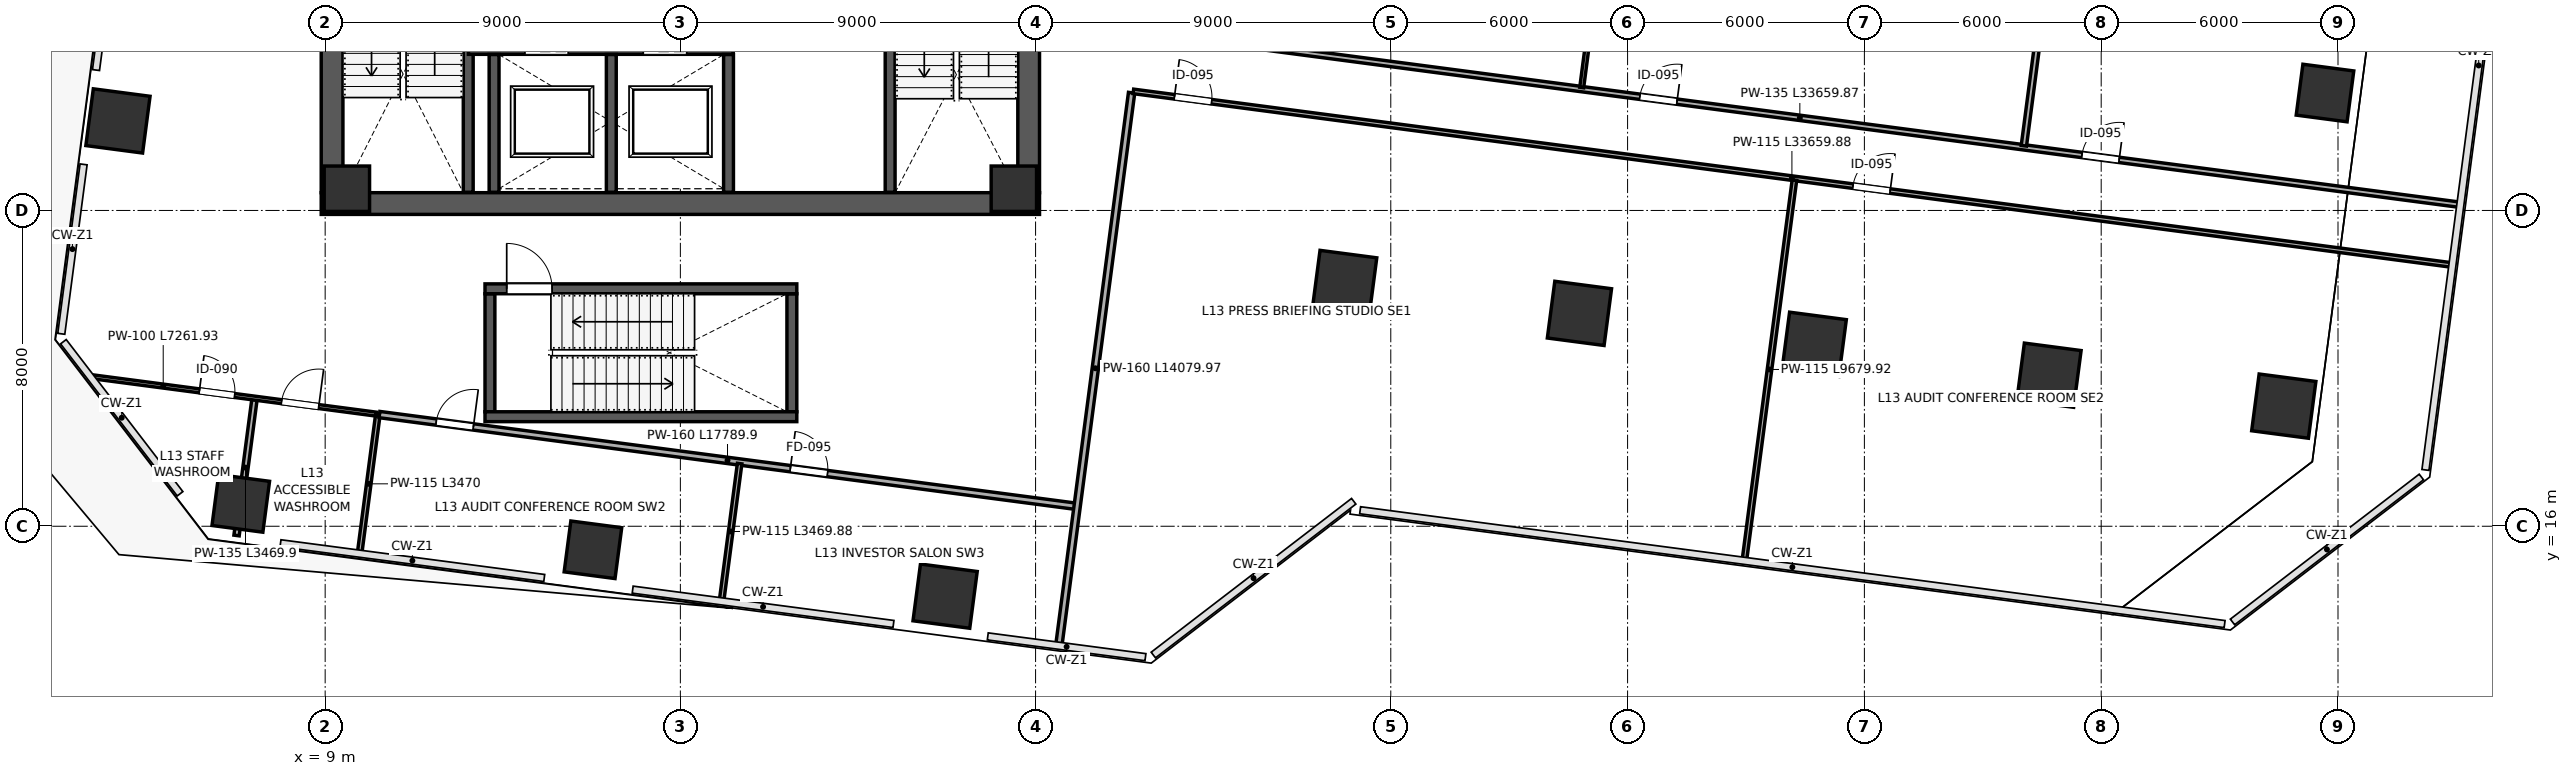
"""IFC4 building model, lengths in metres.
Left out: names, types, materials, properties, quantities, classifications, styles, units other than length and angle.
Written with IfcOpenShell. Run it as: python <this file> out.ifc"""

import sys

from ifc_helpers import new_model, si_unit, direction, frame, frame_2d, origin, origin_2d, place, context, subcontext, project, spatial, rectangle, extrude, source, transform, mapped, element, fill, save


model = new_model("IFC4")
c1 = context("Model", 3, precision=1e-05, world=origin(), true_north=direction((0.0, 1.0)))
c2 = subcontext(c1, "Body", "Model", "MODEL_VIEW")
j1 = project(units=[si_unit("LENGTHUNIT", "METRE"), si_unit("PLANEANGLEUNIT", "RADIAN")], contexts=[c1])
p1 = place(None, origin())
s1 = spatial("IfcSite", under=j1, at=p1, CompositionType="ELEMENT")
p2 = place(p1, origin())
s2 = spatial("IfcBuilding", under=s1, at=p2, CompositionType="ELEMENT")
p3 = place(p2, frame((0.0, 0.0, 61.6)))
s3 = spatial("IfcBuildingStorey", under=s2, at=p3, CompositionType="ELEMENT", Elevation=61.6)
m1 = source(origin(), c2, "Body", "SweptSolid", [
    extrude(rectangle(XDim=1.15, YDim=1.15, at=origin_2d()), origin(), (0.0, 0.0, 1.0), 4.798),
])
for number, where, z_axis, x_axis in (
    (1, (9.55, 24.55, 0.001), (0.0, 0.0, 1.0), (1.0, 0.0, 0.0)),
    (2, (26.45, 24.55, 0.001), (0.0, 0.0, 1.0), (1.0, 0.0, 0.0)),
):
    element("IfcColumn", number, at=place(p3, frame(where, z_axis=z_axis, x_axis=x_axis)), inside=s3, PredefinedType="COLUMN", context=c2, shape_type="MappedRepresentation", body=[
        mapped(m1, transform((0.0, 0.0, 0.0), scale=1.0)),
    ])
m2 = source(origin(), c2, "Body", "SweptSolid", [
    extrude(rectangle(XDim=1.3, YDim=1.3, at=origin_2d()), origin(), (0.0, 0.0, 1.0), 4.798),
])
for number, where, z_axis, x_axis in (
    (3, (6.862, 16.579, 0.001), (0.0, 0.0, 1.0), (-0.991, 0.131, 0.0)),
    (4, (15.785, 15.404, 0.001), (0.0, 0.0, 1.0), (-0.991, 0.131, 0.0)),
):
    element("IfcColumn", number, at=place(p3, frame(where, z_axis=z_axis, x_axis=x_axis)), inside=s3, PredefinedType="COLUMN", context=c2, shape_type="MappedRepresentation", body=[
        mapped(m2, transform((0.0, 0.0, 0.0), scale=1.0)),
    ])
m3 = source(origin(), c2, "Body", "SweptSolid", [
    extrude(rectangle(XDim=1.45, YDim=1.45, at=origin_2d()), origin(), (0.0, 0.0, 1.0), 4.798),
])
p4 = place(p3, frame((24.708, 14.229, 0.001), z_axis=(0.0, 0.0, 1.0), x_axis=(-0.991444861374, 0.13052619222, 0.0)))
e5 = element("IfcColumn", 5, at=p4, inside=s3, PredefinedType="COLUMN", context=c2, shape_type="MappedRepresentation", body=[
    mapped(m3, transform((0.0, 0.0, 0.0), scale=1.0)),
])
m4 = source(origin(), c2, "Body", "SweptSolid", [
    extrude(rectangle(XDim=1.45, YDim=1.45, at=origin_2d()), origin(), (0.0, 0.0, 1.0), 4.798),
])
for number, where, z_axis, x_axis in (
    (6, (34.832, 22.176, 0.001), (0.0, 0.0, 1.0), (-0.991, 0.131, 0.0)),
    (7, (40.781, 21.393, 0.001), (0.0, 0.0, 1.0), (-0.991, 0.131, 0.0)),
    (8, (46.729, 20.61, 0.001), (0.0, 0.0, 1.0), (-0.991, 0.131, 0.0)),
    (9, (52.678, 19.826, 0.001), (0.0, 0.0, 1.0), (-0.991, 0.131, 0.0)),
):
    element("IfcColumn", number, at=place(p3, frame(where, z_axis=z_axis, x_axis=x_axis)), inside=s3, PredefinedType="COLUMN", context=c2, shape_type="MappedRepresentation", body=[
        mapped(m4, transform((0.0, 0.0, 0.0), scale=1.0)),
    ])
p5 = place(p3, frame((58.626, 19.043, 0.001), z_axis=(0.0, 0.0, 1.0), x_axis=(-0.991444861374, 0.13052619222, 0.0)))
e10 = element("IfcColumn", 10, at=p5, inside=s3, PredefinedType="COLUMN", context=c2, shape_type="MappedRepresentation", body=[
    mapped(m3, transform((0.0, 0.0, 0.0), scale=1.0)),
])
p6 = place(p3, frame((59.671, 26.975, 0.001), z_axis=(0.0, 0.0, 1.0), x_axis=(-0.991444861374, 0.13052619222, 0.0)))
e11 = element("IfcColumn", 11, at=p6, inside=s3, PredefinedType="COLUMN", context=c2, shape_type="MappedRepresentation", body=[
    mapped(m2, transform((0.0, 0.0, 0.0), scale=1.0)),
])
p7 = place(p3, frame((3.75, 26.268, 0.001), z_axis=(0.0, 0.0, 1.0), x_axis=(-0.991444861374, 0.13052619222, 0.0)))
e12 = element("IfcColumn", 12, at=p7, inside=s3, PredefinedType="COLUMN", context=c2, shape_type="MappedRepresentation", body=[
    mapped(m3, transform((0.0, 0.0, 0.0), scale=1.0)),
])
p8 = place(p3, frame((9.175, 24.45, 0.0), z_axis=(0.0, 0.0, 1.0), x_axis=(0.0, 1.0, 0.0)))
e13 = element("IfcWall", 13, at=p8, inside=s3, PredefinedType="SHEAR", context=c2, shape_type="SweptSolid", body=[
    extrude(rectangle(XDim=15.1, YDim=0.55, at=frame_2d((7.55, 0.0))), origin(), (0.0, 0.0, 1.0), 4.56),
])
p9 = place(p3, frame((26.825, 24.45, 0.0), z_axis=(0.0, 0.0, 1.0), x_axis=(0.0, 1.0, 0.0)))
e14 = element("IfcWall", 14, at=p9, inside=s3, PredefinedType="SHEAR", context=c2, shape_type="SweptSolid", body=[
    extrude(rectangle(XDim=15.1, YDim=0.55, at=frame_2d((7.55, 0.0))), origin(), (0.0, 0.0, 1.0), 4.56),
])
p10 = place(p9, frame((8.6, 0.0, 0.0)))
e15 = element("IfcOpeningElement", 15, at=p10, cuts=e14, PredefinedType="OPENING", context=c2, shape_type="SweptSolid", body=[
    extrude(rectangle(XDim=1.15, YDim=2.2, at=frame_2d((0.575, 1.1))), frame((0.0, 0.285, 0.0), z_axis=(0.0, -1.0, 0.0), x_axis=(1.0, 0.0, 0.0)), (0.0, 0.0, 1.0), 0.57),
])
p11 = place(p3, frame((8.9, 24.175, 0.0), z_axis=(0.0, 0.0, 1.0), x_axis=(1.0, 0.0, 0.0)))
e16 = element("IfcWall", 16, at=p11, inside=s3, PredefinedType="SHEAR", context=c2, shape_type="SweptSolid", body=[
    extrude(rectangle(XDim=18.2, YDim=0.55, at=frame_2d((9.1, 0.0))), origin(), (0.0, 0.0, 1.0), 4.56),
])
p12 = place(p3, frame((12.625, 24.46, 0.0), z_axis=(0.0, 0.0, 1.0), x_axis=(0.0, 1.0, 0.0)))
e17 = element("IfcWall", 17, at=p12, inside=s3, PredefinedType="SHEAR", context=c2, shape_type="SweptSolid", body=[
    extrude(rectangle(XDim=7.49, YDim=0.25, at=frame_2d((3.745, 0.0))), origin(), (0.0, 0.0, 1.0), 4.56),
])
p13 = place(p12, frame((5.85, 0.0, 0.0)))
e18 = element("IfcOpeningElement", 18, at=p13, cuts=e17, PredefinedType="OPENING", context=c2, shape_type="SweptSolid", body=[
    extrude(rectangle(XDim=1.15, YDim=2.2, at=frame_2d((0.575, 1.1))), frame((0.0, 0.135, 0.0), z_axis=(0.0, -1.0, 0.0), x_axis=(1.0, 0.0, 0.0)), (0.0, 0.0, 1.0), 0.27),
])
p14 = place(p3, frame((23.315, 24.46, 0.0), z_axis=(0.0, 0.0, 1.0), x_axis=(0.0, 1.0, 0.0)))
e19 = element("IfcWall", 19, at=p14, inside=s3, PredefinedType="SHEAR", context=c2, shape_type="SweptSolid", body=[
    extrude(rectangle(XDim=7.49, YDim=0.25, at=frame_2d((3.745, 0.0))), origin(), (0.0, 0.0, 1.0), 4.56),
])
p15 = place(p3, frame((12.63, 28.08, 0.0), z_axis=(0.0, 0.0, 1.0), x_axis=(1.0, 0.0, 0.0)))
e20 = element("IfcWall", 20, at=p15, inside=s3, PredefinedType="SHEAR", context=c2, shape_type="SweptSolid", body=[
    extrude(rectangle(XDim=6.71, YDim=0.25, at=frame_2d((3.355, 0.0))), origin(), (0.0, 0.0, 1.0), 4.56),
])
p16 = place(p15, frame((1.43, 0.0, 0.0)))
e21 = element("IfcOpeningElement", 21, at=p16, cuts=e20, PredefinedType="OPENING", context=c2, shape_type="SweptSolid", body=[
    extrude(rectangle(XDim=1.1, YDim=2.2, at=frame_2d((0.55, 1.1))), frame((0.0, 0.135, 0.0), z_axis=(0.0, -1.0, 0.0), x_axis=(1.0, 0.0, 0.0)), (0.0, 0.0, 1.0), 0.27),
])
p17 = place(p15, frame((4.43, 0.0, 0.0)))
e22 = element("IfcOpeningElement", 22, at=p17, cuts=e20, PredefinedType="OPENING", context=c2, shape_type="SweptSolid", body=[
    extrude(rectangle(XDim=1.1, YDim=2.2, at=frame_2d((0.55, 1.1))), frame((0.0, 0.135, 0.0), z_axis=(0.0, -1.0, 0.0), x_axis=(1.0, 0.0, 0.0)), (0.0, 0.0, 1.0), 0.27),
])
for number, where, z_axis, x_axis in (
    (23, (13.28, 24.46, 0.0), (0.0, 0.0, 1.0), (0.0, 1.0, 0.0)),
    (24, (16.25, 24.46, 0.0), (0.0, 0.0, 1.0), (0.0, 1.0, 0.0)),
    (25, (19.22, 24.46, 0.0), (0.0, 0.0, 1.0), (0.0, 1.0, 0.0)),
):
    element("IfcWall", number, at=place(p3, frame(where, z_axis=z_axis, x_axis=x_axis)), inside=s3, PredefinedType="SHEAR", context=c2, shape_type="SweptSolid", body=[
        extrude(rectangle(XDim=3.49, YDim=0.25, at=frame_2d((1.745, 0.0))), origin(), (0.0, 0.0, 1.0), 4.56),
    ])
for number, where, z_axis, x_axis in (
    (26, (13.175, 18.9, 0.0), (0.0, 0.0, 1.0), (0.0, 1.0, 0.0)),
    (27, (20.825, 18.9, 0.0), (0.0, 0.0, 1.0), (0.0, 1.0, 0.0)),
):
    element("IfcWall", number, at=place(p3, frame(where, z_axis=z_axis, x_axis=x_axis)), inside=s3, PredefinedType="SHEAR", context=c2, shape_type="SweptSolid", body=[
        extrude(rectangle(XDim=2.99, YDim=0.25, at=frame_2d((1.495, 0.0))), origin(), (0.0, 0.0, 1.0), 4.56),
    ])
p18 = place(p3, frame((13.05, 18.775, 0.0), z_axis=(0.0, 0.0, 1.0), x_axis=(1.0, 0.0, 0.0)))
e28 = element("IfcWall", 28, at=p18, inside=s3, PredefinedType="SHEAR", context=c2, shape_type="SweptSolid", body=[
    extrude(rectangle(XDim=7.9, YDim=0.25, at=frame_2d((3.95, 0.0))), origin(), (0.0, 0.0, 1.0), 4.56),
])
p19 = place(p3, frame((13.05, 22.015, 0.0), z_axis=(0.0, 0.0, 1.0), x_axis=(1.0, 0.0, 0.0)))
e29 = element("IfcWall", 29, at=p19, inside=s3, PredefinedType="SHEAR", context=c2, shape_type="SweptSolid", body=[
    extrude(rectangle(XDim=7.9, YDim=0.25, at=frame_2d((3.95, 0.0))), origin(), (0.0, 0.0, 1.0), 4.56),
])
p20 = place(p19, frame((0.55, 0.0, 0.0)))
e30 = element("IfcOpeningElement", 30, at=p20, cuts=e29, PredefinedType="OPENING", context=c2, shape_type="SweptSolid", body=[
    extrude(rectangle(XDim=1.15, YDim=2.2, at=frame_2d((0.575, 1.1))), frame((0.0, 0.135, 0.0), z_axis=(0.0, -1.0, 0.0), x_axis=(1.0, 0.0, 0.0)), (0.0, 0.0, 1.0), 0.27),
])
p21 = place(p3, frame((6.755, 15.766, 0.0), z_axis=(0.0, 0.0, 1.0), x_axis=(0.130518214887, 0.991445911577, 0.0)))
e31 = element("IfcWall", 31, at=p21, inside=s3, PredefinedType="PARTITIONING", context=c2, shape_type="SweptSolid", body=[
    extrude(rectangle(XDim=3.47, YDim=0.135, at=frame_2d((1.735, 0.0))), origin(), (0.0, 0.0, 1.0), 3.695),
])
p22 = place(p3, frame((9.878, 15.354, 0.0), z_axis=(0.0, 0.0, 1.0), x_axis=(0.130509110781, 0.991447110038, 0.0)))
e32 = element("IfcWall", 32, at=p22, inside=s3, PredefinedType="PARTITIONING", context=c2, shape_type="SweptSolid", body=[
    extrude(rectangle(XDim=3.47, YDim=0.115, at=frame_2d((1.735, 0.0))), origin(), (0.0, 0.0, 1.0), 3.695),
])
p23 = place(p3, frame((3.097, 19.788, 0.0), z_axis=(0.0, 0.0, 1.0), x_axis=(0.99144674145, -0.130511910828, 0.0)))
e33 = element("IfcWall", 33, at=p23, inside=s3, PredefinedType="PARTITIONING", context=c2, shape_type="SweptSolid", body=[
    extrude(rectangle(XDim=7.262, YDim=0.1, at=frame_2d((3.631, 0.0))), origin(), (0.0, 0.0, 1.0), 4.56),
])
p24 = place(p23, frame((2.74, 0.0, 0.0)))
e34 = element("IfcOpeningElement", 34, at=p24, cuts=e33, PredefinedType="OPENING", context=c2, shape_type="SweptSolid", body=[
    extrude(rectangle(XDim=0.9, YDim=2.15, at=frame_2d((0.45, 1.075))), frame((0.0, 0.06, 0.0), z_axis=(0.0, -1.0, 0.0), x_axis=(1.0, 0.0, 0.0)), (0.0, 0.0, 1.0), 0.12),
])
p25 = place(p23, frame((4.84, 0.0, 0.0)))
e35 = element("IfcOpeningElement", 35, at=p25, cuts=e33, PredefinedType="OPENING", context=c2, shape_type="SweptSolid", body=[
    extrude(rectangle(XDim=0.95, YDim=2.15, at=frame_2d((0.475, 1.075))), frame((0.0, 0.06, 0.0), z_axis=(0.0, -1.0, 0.0), x_axis=(1.0, 0.0, 0.0)), (0.0, 0.0, 1.0), 0.12),
])
p26 = place(p3, frame((10.376, 18.829, 0.0), z_axis=(0.0, 0.0, 1.0), x_axis=(0.99144504436, -0.130524802294, 0.0)))
e36 = element("IfcWall", 36, at=p26, inside=s3, PredefinedType="PARTITIONING", context=c2, shape_type="SweptSolid", body=[
    extrude(rectangle(XDim=17.79, YDim=0.16, at=frame_2d((8.895, 0.0))), origin(), (0.0, 0.0, 1.0), 4.56),
])
p27 = place(p26, frame((1.45, 0.0, 0.0)))
e37 = element("IfcOpeningElement", 37, at=p27, cuts=e36, PredefinedType="OPENING", context=c2, shape_type="SweptSolid", body=[
    extrude(rectangle(XDim=0.95, YDim=2.15, at=frame_2d((0.475, 1.075))), frame((0.0, 0.09, 0.0), z_axis=(0.0, -1.0, 0.0), x_axis=(1.0, 0.0, 0.0)), (0.0, 0.0, 1.0), 0.18),
])
p28 = place(p26, frame((10.5, 0.0, 0.0)))
e38 = element("IfcOpeningElement", 38, at=p28, cuts=e36, PredefinedType="OPENING", context=c2, shape_type="SweptSolid", body=[
    extrude(rectangle(XDim=0.95, YDim=2.15, at=frame_2d((0.475, 1.075))), frame((0.0, 0.09, 0.0), z_axis=(0.0, -1.0, 0.0), x_axis=(1.0, 0.0, 0.0)), (0.0, 0.0, 1.0), 0.18),
])
p29 = place(p3, frame((19.049, 14.147, 0.0), z_axis=(0.0, 0.0, 1.0), x_axis=(0.130518214887, 0.991445911577, 0.0)))
e39 = element("IfcWall", 39, at=p29, inside=s3, PredefinedType="PARTITIONING", context=c2, shape_type="SweptSolid", body=[
    extrude(rectangle(XDim=3.47, YDim=0.115, at=frame_2d((1.735, 0.0))), origin(), (0.0, 0.0, 1.0), 3.695),
])
p30 = place(p3, frame((27.595, 13.022, 0.0), z_axis=(0.0, 0.0, 1.0), x_axis=(0.130532558102, 0.991444023269, 0.0)))
e40 = element("IfcWall", 40, at=p30, inside=s3, PredefinedType="PARTITIONING", context=c2, shape_type="SweptSolid", body=[
    extrude(rectangle(XDim=14.08, YDim=0.16, at=frame_2d((7.04, 0.0))), origin(), (0.0, 0.0, 1.0), 4.56),
])
p31 = place(p3, frame((29.679, 28.543, 0.0), z_axis=(0.0, 0.0, 1.0), x_axis=(0.991444714197, -0.130527310133, 0.0)))
e41 = element("IfcWall", 41, at=p31, inside=s3, PredefinedType="PARTITIONING", context=c2, shape_type="SweptSolid", body=[
    extrude(rectangle(XDim=33.66, YDim=0.135, at=frame_2d((16.83, 0.0))), origin(), (0.0, 0.0, 1.0), 3.695),
])
p32 = place(p31, frame((1.05, 0.0, 0.0)))
e42 = element("IfcOpeningElement", 42, at=p32, cuts=e41, PredefinedType="OPENING", context=c2, shape_type="SweptSolid", body=[
    extrude(rectangle(XDim=0.95, YDim=2.15, at=frame_2d((0.475, 1.075))), frame((0.0, 0.078, 0.0), z_axis=(0.0, -1.0, 0.0), x_axis=(1.0, 0.0, 0.0)), (0.0, 0.0, 1.0), 0.155),
])
p33 = place(p31, frame((12.74, 0.0, 0.0)))
e43 = element("IfcOpeningElement", 43, at=p33, cuts=e41, PredefinedType="OPENING", context=c2, shape_type="SweptSolid", body=[
    extrude(rectangle(XDim=0.95, YDim=2.15, at=frame_2d((0.475, 1.075))), frame((0.0, 0.078, 0.0), z_axis=(0.0, -1.0, 0.0), x_axis=(1.0, 0.0, 0.0)), (0.0, 0.0, 1.0), 0.155),
])
p34 = place(p31, frame((24.04, 0.0, 0.0)))
e44 = element("IfcOpeningElement", 44, at=p34, cuts=e41, PredefinedType="OPENING", context=c2, shape_type="SweptSolid", body=[
    extrude(rectangle(XDim=0.95, YDim=2.15, at=frame_2d((0.475, 1.075))), frame((0.0, 0.078, 0.0), z_axis=(0.0, -1.0, 0.0), x_axis=(1.0, 0.0, 0.0)), (0.0, 0.0, 1.0), 0.155),
])
p35 = place(p3, frame((29.478, 27.016, 0.0), z_axis=(0.0, 0.0, 1.0), x_axis=(0.991444590622, -0.130528248771, 0.0)))
e45 = element("IfcWall", 45, at=p35, inside=s3, PredefinedType="PARTITIONING", context=c2, shape_type="SweptSolid", body=[
    extrude(rectangle(XDim=33.66, YDim=0.115, at=frame_2d((16.83, 0.0))), origin(), (0.0, 0.0, 1.0), 3.695),
])
p36 = place(p35, frame((1.05, 0.0, 0.0)))
e46 = element("IfcOpeningElement", 46, at=p36, cuts=e45, PredefinedType="OPENING", context=c2, shape_type="SweptSolid", body=[
    extrude(rectangle(XDim=0.95, YDim=2.15, at=frame_2d((0.475, 1.075))), frame((0.0, 0.067, 0.0), z_axis=(0.0, -1.0, 0.0), x_axis=(1.0, 0.0, 0.0)), (0.0, 0.0, 1.0), 0.135),
])
p37 = place(p35, frame((18.39, 0.0, 0.0)))
e47 = element("IfcOpeningElement", 47, at=p37, cuts=e45, PredefinedType="OPENING", context=c2, shape_type="SweptSolid", body=[
    extrude(rectangle(XDim=0.95, YDim=2.15, at=frame_2d((0.475, 1.075))), frame((0.0, 0.067, 0.0), z_axis=(0.0, -1.0, 0.0), x_axis=(1.0, 0.0, 0.0)), (0.0, 0.0, 1.0), 0.135),
])
p38 = place(p3, frame((40.838, 27.114, 0.0), z_axis=(0.0, 0.0, 1.0), x_axis=(0.130538190585, 0.991443281685, 0.0)))
e48 = element("IfcWall", 48, at=p38, inside=s3, PredefinedType="PARTITIONING", context=c2, shape_type="SweptSolid", body=[
    extrude(rectangle(XDim=18.34, YDim=0.1, at=frame_2d((9.17, 0.0))), origin(), (0.0, 0.0, 1.0), 4.56),
])
p39 = place(p3, frame((52.041, 25.639, 0.0), z_axis=(0.0, 0.0, 1.0), x_axis=(0.130523382643, 0.991445231258, 0.0)))
e49 = element("IfcWall", 49, at=p39, inside=s3, PredefinedType="PARTITIONING", context=c2, shape_type="SweptSolid", body=[
    extrude(rectangle(XDim=18.34, YDim=0.135, at=frame_2d((9.17, 0.0))), origin(), (0.0, 0.0, 1.0), 3.923),
])
p40 = place(p3, frame((44.964, 15.173, 0.0), z_axis=(0.0, 0.0, 1.0), x_axis=(0.130519754353, 0.991445708914, 0.0)))
e50 = element("IfcWall", 50, at=p40, inside=s3, PredefinedType="PARTITIONING", context=c2, shape_type="SweptSolid", body=[
    extrude(rectangle(XDim=9.68, YDim=0.115, at=frame_2d((4.84, 0.0))), origin(), (0.0, 0.0, 1.0), 4.56),
])
m5 = source(origin(), c2, "Body", "SweptSolid", [
    extrude(rectangle(XDim=1.15, YDim=2.2, at=frame_2d((0.575, 1.1))), frame((0.0, 0.025, 0.0), z_axis=(0.0, -1.0, 0.0), x_axis=(1.0, 0.0, 0.0)), (0.0, 0.0, 1.0), 0.05),
])
p41 = place(p20, origin())
e51 = element("IfcDoor", 51, at=p41, inside=s3, OperationType="SINGLE_SWING_LEFT", PredefinedType="DOOR", context=c2, shape_type="MappedRepresentation", body=[
    mapped(m5, transform((0.0, 0.0, 0.0), scale=1.0)),
])
fill(e30, e51)
m6 = source(origin(), c2, "Body", "SweptSolid", [
    extrude(rectangle(XDim=0.9, YDim=2.15, at=frame_2d((0.45, 1.075))), frame((0.0, 0.025, 0.0), z_axis=(0.0, -1.0, 0.0), x_axis=(1.0, 0.0, 0.0)), (0.0, 0.0, 1.0), 0.05),
])
p42 = place(p24, origin())
e52 = element("IfcDoor", 52, at=p42, inside=s3, OperationType="SINGLE_SWING_LEFT", PredefinedType="DOOR", context=c2, shape_type="MappedRepresentation", body=[
    mapped(m6, transform((0.0, 0.0, 0.0), scale=1.0)),
])
fill(e34, e52)
m7 = source(origin(), c2, "Body", "SweptSolid", [
    extrude(rectangle(XDim=0.95, YDim=2.15, at=frame_2d((0.475, 1.075))), frame((0.0, 0.025, 0.0), z_axis=(0.0, -1.0, 0.0), x_axis=(1.0, 0.0, 0.0)), (0.0, 0.0, 1.0), 0.05),
])
p43 = place(p25, origin())
e53 = element("IfcDoor", 53, at=p43, inside=s3, OperationType="SINGLE_SWING_RIGHT", PredefinedType="DOOR", context=c2, shape_type="MappedRepresentation", body=[
    mapped(m7, transform((0.0, 0.0, 0.0), scale=1.0)),
])
fill(e35, e53)
m8 = source(origin(), c2, "Body", "SweptSolid", [
    extrude(rectangle(XDim=0.95, YDim=2.15, at=frame_2d((0.475, 1.075))), frame((0.0, 0.025, 0.0), z_axis=(0.0, -1.0, 0.0), x_axis=(1.0, 0.0, 0.0)), (0.0, 0.0, 1.0), 0.05),
])
p44 = place(p27, origin())
e54 = element("IfcDoor", 54, at=p44, inside=s3, OperationType="SINGLE_SWING_RIGHT", PredefinedType="DOOR", context=c2, shape_type="MappedRepresentation", body=[
    mapped(m8, transform((0.0, 0.0, 0.0), scale=1.0)),
])
fill(e37, e54)
p45 = place(p28, origin())
e55 = element("IfcDoor", 55, at=p45, inside=s3, OperationType="SINGLE_SWING_LEFT", PredefinedType="DOOR", context=c2, shape_type="MappedRepresentation", body=[
    mapped(m8, transform((0.0, 0.0, 0.0), scale=1.0)),
])
fill(e38, e55)
p46 = place(p33, origin())
e56 = element("IfcDoor", 56, at=p46, inside=s3, OperationType="SINGLE_SWING_RIGHT", PredefinedType="DOOR", context=c2, shape_type="MappedRepresentation", body=[
    mapped(m7, transform((0.0, 0.0, 0.0), scale=1.0)),
])
fill(e43, e56)
p47 = place(p34, origin())
e57 = element("IfcDoor", 57, at=p47, inside=s3, OperationType="SINGLE_SWING_RIGHT", PredefinedType="DOOR", context=c2, shape_type="MappedRepresentation", body=[
    mapped(m7, transform((0.0, 0.0, 0.0), scale=1.0)),
])
fill(e44, e57)
p48 = place(p36, origin())
e58 = element("IfcDoor", 58, at=p48, inside=s3, OperationType="SINGLE_SWING_LEFT", PredefinedType="DOOR", context=c2, shape_type="MappedRepresentation", body=[
    mapped(m7, transform((0.0, 0.0, 0.0), scale=1.0)),
])
fill(e46, e58)
p49 = place(p37, origin())
e59 = element("IfcDoor", 59, at=p49, inside=s3, OperationType="SINGLE_SWING_RIGHT", PredefinedType="DOOR", context=c2, shape_type="MappedRepresentation", body=[
    mapped(m7, transform((0.0, 0.0, 0.0), scale=1.0)),
])
fill(e47, e59)
save(model, sys.argv[1])
